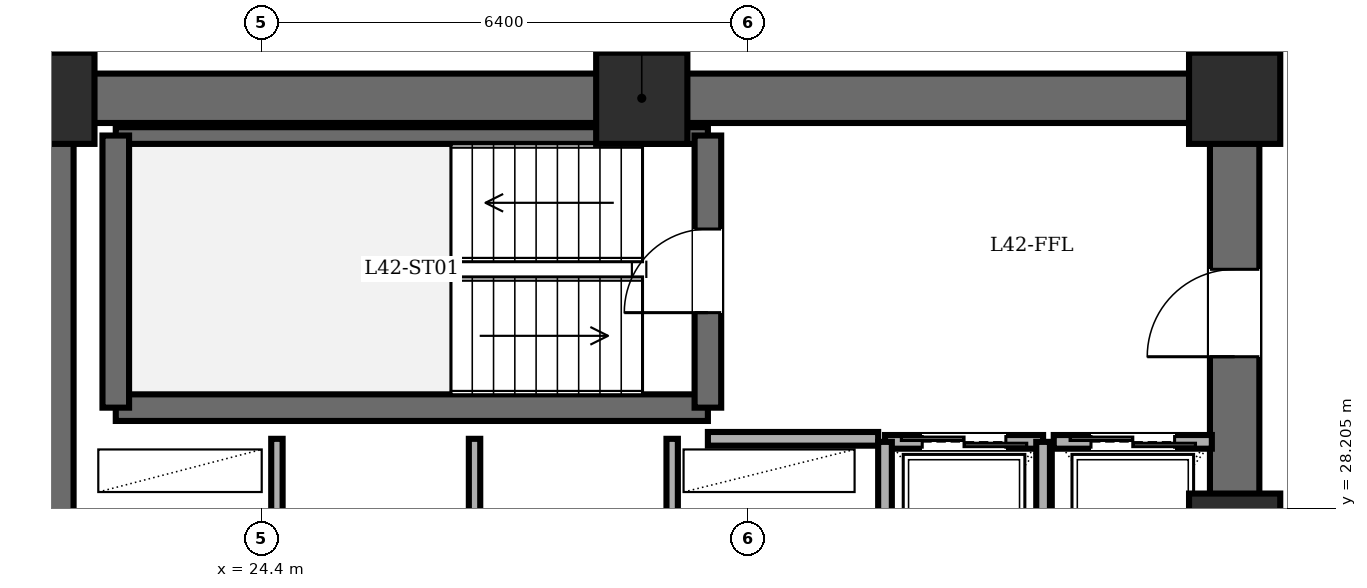
"""IFC4 building model, lengths in metres.
Left out: names, types, materials, properties, quantities, classifications, styles, units other than length and angle.
Written with IfcOpenShell. Run it as: python <this file> out.ifc"""

import sys

from ifc_helpers import new_model, si_unit, direction, frame, frame_2d, origin, origin_2d, place, context, subcontext, project, spatial, rectangle, extrude, element, fill, save


model = new_model("IFC4")
c1 = context("Model", 3, precision=1e-05, world=origin(), true_north=direction((0.0, 1.0)))
c2 = subcontext(c1, "Body", "Model", "MODEL_VIEW")
j1 = project(units=[si_unit("LENGTHUNIT", "METRE"), si_unit("PLANEANGLEUNIT", "RADIAN")], contexts=[c1])
p1 = place(None, origin())
s1 = spatial("IfcSite", under=j1, at=p1, CompositionType="ELEMENT")
p2 = place(p1, origin())
s2 = spatial("IfcBuilding", under=s1, at=p2, CompositionType="ELEMENT")
p3 = place(p2, frame((0.0, 0.0, 161.8)))
s3 = spatial("IfcBuildingStorey", under=s2, at=p3, CompositionType="ELEMENT", Elevation=161.8)
for number, where, z_axis, x_axis in (
    (1, (37.2, 27.8, 0.0), (0.0, 0.0, 1.0), (1.0, 0.0, 0.0)),
    (2, (37.2, 33.6, 0.0), (0.0, 0.0, 1.0), (1.0, 0.0, 0.0)),
    (3, (29.4, 33.6, 0.0), (0.0, 0.0, 1.0), (1.0, 0.0, 0.0)),
    (4, (21.6, 33.6, 0.0), (0.0, 0.0, 1.0), (1.0, 0.0, 0.0)),
):
    element("IfcColumn", number, at=place(p3, frame(where, z_axis=z_axis, x_axis=x_axis)), inside=s3, PredefinedType="COLUMN", context=c2, shape_type="SweptSolid", body=[
        extrude(rectangle(XDim=1.2, YDim=1.2, at=origin_2d()), origin(), (0.0, 0.0, 1.0), 3.6),
    ])
p4 = place(p3, frame((21.6, 14.4, 0.0), z_axis=(0.0, 0.0, 1.0), x_axis=(0.0, 1.0, 0.0)))
e5 = element("IfcWall", 5, at=p4, inside=s3, PredefinedType="SHEAR", context=c2, shape_type="SweptSolid", body=[
    extrude(rectangle(XDim=19.2, YDim=0.65, at=frame_2d((9.6, 0.0))), origin(), (0.0, 0.0, 1.0), 3.4),
])
p5 = place(p3, frame((21.6, 33.6, 0.0), z_axis=(0.0, 0.0, 1.0), x_axis=(1.0, 0.0, 0.0)))
e6 = element("IfcWall", 6, at=p5, inside=s3, PredefinedType="SHEAR", context=c2, shape_type="SweptSolid", body=[
    extrude(rectangle(XDim=15.6, YDim=0.65, at=frame_2d((7.8, 0.0))), origin(), (0.0, 0.0, 1.0), 3.4),
])
p6 = place(p3, frame((37.2, 14.4, 0.0), z_axis=(0.0, 0.0, 1.0), x_axis=(0.0, 1.0, 0.0)))
e7 = element("IfcWall", 7, at=p6, inside=s3, PredefinedType="SHEAR", context=c2, shape_type="SweptSolid", body=[
    extrude(rectangle(XDim=19.2, YDim=0.65, at=frame_2d((9.6, 0.0))), origin(), (0.0, 0.0, 1.0), 3.4),
])
p7 = place(p6, frame((15.8, 0.0, 0.0)))
e8 = element("IfcOpeningElement", 8, at=p7, cuts=e7, PredefinedType="OPENING", context=c2, shape_type="SweptSolid", body=[
    extrude(rectangle(XDim=1.15, YDim=2.15, at=frame_2d((0.575, 1.075))), frame((0.0, 0.335, 0.0), z_axis=(0.0, -1.0, 0.0), x_axis=(1.0, 0.0, 0.0)), (0.0, 0.0, 1.0), 0.67),
])
p8 = place(p6, frame((3.6, 0.0, 0.0)))
e9 = element("IfcOpeningElement", 9, at=p8, cuts=e7, PredefinedType="OPENING", context=c2, shape_type="SweptSolid", body=[
    extrude(rectangle(XDim=1.1, YDim=2.15, at=frame_2d((0.55, 1.075))), frame((0.0, 0.335, 0.0), z_axis=(0.0, -1.0, 0.0), x_axis=(1.0, 0.0, 0.0)), (0.0, 0.0, 1.0), 0.67),
])
p9 = place(p6, frame((8.6, 0.0, 0.0)))
e10 = element("IfcOpeningElement", 10, at=p9, cuts=e7, PredefinedType="OPENING", context=c2, shape_type="SweptSolid", body=[
    extrude(rectangle(XDim=1.3, YDim=2.2, at=frame_2d((0.65, 1.1))), frame((0.0, 0.335, 0.0), z_axis=(0.0, -1.0, 0.0), x_axis=(1.0, 0.0, 0.0)), (0.0, 0.0, 1.0), 0.67),
])
p10 = place(p3, frame((22.48, 29.53, 0.0), z_axis=(0.0, 0.0, 1.0), x_axis=(1.0, 0.0, 0.0)))
e11 = element("IfcWall", 11, at=p10, inside=s3, PredefinedType="SOLIDWALL", context=c2, shape_type="SweptSolid", body=[
    extrude(rectangle(XDim=7.79, YDim=0.35, at=frame_2d((3.895, 0.0))), origin(), (0.0, 0.0, 1.0), 3.4),
])
p11 = place(p3, frame((22.48, 33.11, 0.0), z_axis=(0.0, 0.0, 1.0), x_axis=(1.0, 0.0, 0.0)))
e12 = element("IfcWall", 12, at=p11, inside=s3, PredefinedType="PARTITIONING", context=c2, shape_type="SweptSolid", body=[
    extrude(rectangle(XDim=7.79, YDim=0.22, at=frame_2d((3.895, 0.0))), origin(), (0.0, 0.0, 1.0), 3.4),
])
p12 = place(p3, frame((22.48, 29.53, 0.0), z_axis=(0.0, 0.0, 1.0), x_axis=(0.0, 1.0, 0.0)))
e13 = element("IfcWall", 13, at=p12, inside=s3, PredefinedType="SOLIDWALL", context=c2, shape_type="SweptSolid", body=[
    extrude(rectangle(XDim=3.58, YDim=0.35, at=frame_2d((1.79, 0.0))), origin(), (0.0, 0.0, 1.0), 3.4),
])
p13 = place(p3, frame((30.27, 29.53, 0.0), z_axis=(0.0, 0.0, 1.0), x_axis=(0.0, 1.0, 0.0)))
e14 = element("IfcWall", 14, at=p13, inside=s3, PredefinedType="SOLIDWALL", context=c2, shape_type="SweptSolid", body=[
    extrude(rectangle(XDim=3.58, YDim=0.35, at=frame_2d((1.79, 0.0))), origin(), (0.0, 0.0, 1.0), 3.4),
])
p14 = place(p13, frame((1.25, 0.0, 0.0)))
e15 = element("IfcOpeningElement", 15, at=p14, cuts=e14, PredefinedType="OPENING", context=c2, shape_type="SweptSolid", body=[
    extrude(rectangle(XDim=1.1, YDim=2.15, at=frame_2d((0.55, 1.075))), frame((0.0, 0.185, 0.0), z_axis=(0.0, -1.0, 0.0), x_axis=(1.0, 0.0, 0.0)), (0.0, 0.0, 1.0), 0.37),
])
p15 = place(p3, frame((30.27, 29.12, 0.0), z_axis=(0.0, 0.0, 1.0), x_axis=(1.0, 0.0, 0.0)))
e16 = element("IfcWall", 16, at=p15, inside=s3, PredefinedType="PARTITIONING", context=c2, shape_type="SweptSolid", body=[
    extrude(rectangle(XDim=2.24, YDim=0.18, at=frame_2d((1.12, 0.0))), origin(), (0.0, 0.0, 1.0), 3.4),
])
for number, where, z_axis, x_axis in (
    (17, (24.6, 27.6, 0.0), (0.0, 0.0, 1.0), (0.0, 1.0, 0.0)),
    (18, (27.2, 27.6, 0.0), (0.0, 0.0, 1.0), (0.0, 1.0, 0.0)),
    (19, (29.8, 27.6, 0.0), (0.0, 0.0, 1.0), (0.0, 1.0, 0.0)),
):
    element("IfcWall", number, at=place(p3, frame(where, z_axis=z_axis, x_axis=x_axis)), inside=s3, PredefinedType="PARTITIONING", context=c2, shape_type="SweptSolid", body=[
        extrude(rectangle(XDim=1.52, YDim=0.15, at=frame_2d((0.76, 0.0))), origin(), (0.0, 0.0, 1.0), 3.4),
    ])
p16 = place(p3, frame((32.6, 29.08, 0.0), z_axis=(0.0, 0.0, 1.0), x_axis=(1.0, 0.0, 0.0)))
e20 = element("IfcWall", 20, at=p16, inside=s3, PredefinedType="PARTITIONING", context=c2, shape_type="SweptSolid", body=[
    extrude(rectangle(XDim=2.08, YDim=0.18, at=frame_2d((1.04, 0.0))), origin(), (0.0, 0.0, 1.0), 3.4),
])
p17 = place(p16, frame((0.49, 0.0, 0.0)))
e21 = element("IfcOpeningElement", 21, at=p17, cuts=e20, PredefinedType="OPENING", context=c2, shape_type="SweptSolid", body=[
    extrude(rectangle(XDim=1.1, YDim=2.2, at=frame_2d((0.55, 1.1))), frame((0.0, 0.1, 0.0), z_axis=(0.0, -1.0, 0.0), x_axis=(1.0, 0.0, 0.0)), (0.0, 0.0, 1.0), 0.2),
])
for number, where, z_axis, x_axis in (
    (22, (34.68, 26.35, 0.0), (0.0, 0.0, 1.0), (0.0, 1.0, 0.0)),
    (23, (32.6, 29.08, 0.0), (0.0, 0.0, 1.0), (0.0, -1.0, 0.0)),
):
    element("IfcWall", number, at=place(p3, frame(where, z_axis=z_axis, x_axis=x_axis)), inside=s3, PredefinedType="PARTITIONING", context=c2, shape_type="SweptSolid", body=[
        extrude(rectangle(XDim=2.73, YDim=0.18, at=frame_2d((1.365, 0.0))), origin(), (0.0, 0.0, 1.0), 3.4),
    ])
p18 = place(p3, frame((34.82, 29.08, 0.0), z_axis=(0.0, 0.0, 1.0), x_axis=(1.0, 0.0, 0.0)))
e24 = element("IfcWall", 24, at=p18, inside=s3, PredefinedType="PARTITIONING", context=c2, shape_type="SweptSolid", body=[
    extrude(rectangle(XDim=2.08, YDim=0.18, at=frame_2d((1.04, 0.0))), origin(), (0.0, 0.0, 1.0), 3.4),
])
p19 = place(p18, frame((0.49, 0.0, 0.0)))
e25 = element("IfcOpeningElement", 25, at=p19, cuts=e24, PredefinedType="OPENING", context=c2, shape_type="SweptSolid", body=[
    extrude(rectangle(XDim=1.1, YDim=2.2, at=frame_2d((0.55, 1.1))), frame((0.0, 0.1, 0.0), z_axis=(0.0, -1.0, 0.0), x_axis=(1.0, 0.0, 0.0)), (0.0, 0.0, 1.0), 0.2),
])
p20 = place(p14, origin())
e26 = element("IfcDoor", 26, at=p20, inside=s3, OperationType="SINGLE_SWING_LEFT", PredefinedType="DOOR", context=c2, shape_type="SweptSolid", body=[
    extrude(rectangle(XDim=1.1, YDim=2.15, at=frame_2d((0.55, 1.075))), frame((0.0, 0.025, 0.0), z_axis=(0.0, -1.0, 0.0), x_axis=(1.0, 0.0, 0.0)), (0.0, 0.0, 1.0), 0.05),
])
fill(e15, e26)
p21 = place(p7, origin())
e27 = element("IfcDoor", 27, at=p21, inside=s3, OperationType="SINGLE_SWING_LEFT", PredefinedType="DOOR", context=c2, shape_type="SweptSolid", body=[
    extrude(rectangle(XDim=1.15, YDim=2.15, at=frame_2d((0.575, 1.075))), frame((0.0, 0.025, 0.0), z_axis=(0.0, -1.0, 0.0), x_axis=(1.0, 0.0, 0.0)), (0.0, 0.0, 1.0), 0.05),
])
fill(e8, e27)
p22 = place(p17, origin())
e28 = element("IfcDoor", 28, at=p22, inside=s3, OperationType="DOUBLE_DOOR_SLIDING", PredefinedType="DOOR", context=c2, shape_type="SweptSolid", body=[
    extrude(rectangle(XDim=1.1, YDim=2.2, at=frame_2d((0.55, 1.1))), frame((0.0, 0.025, 0.0), z_axis=(0.0, -1.0, 0.0), x_axis=(1.0, 0.0, 0.0)), (0.0, 0.0, 1.0), 0.05),
])
fill(e21, e28)
p23 = place(p19, origin())
e29 = element("IfcDoor", 29, at=p23, inside=s3, OperationType="DOUBLE_DOOR_SLIDING", PredefinedType="DOOR", context=c2, shape_type="SweptSolid", body=[
    extrude(rectangle(XDim=1.1, YDim=2.2, at=frame_2d((0.55, 1.1))), frame((0.0, 0.025, 0.0), z_axis=(0.0, -1.0, 0.0), x_axis=(1.0, 0.0, 0.0)), (0.0, 0.0, 1.0), 0.05),
])
fill(e25, e29)
save(model, sys.argv[1])
